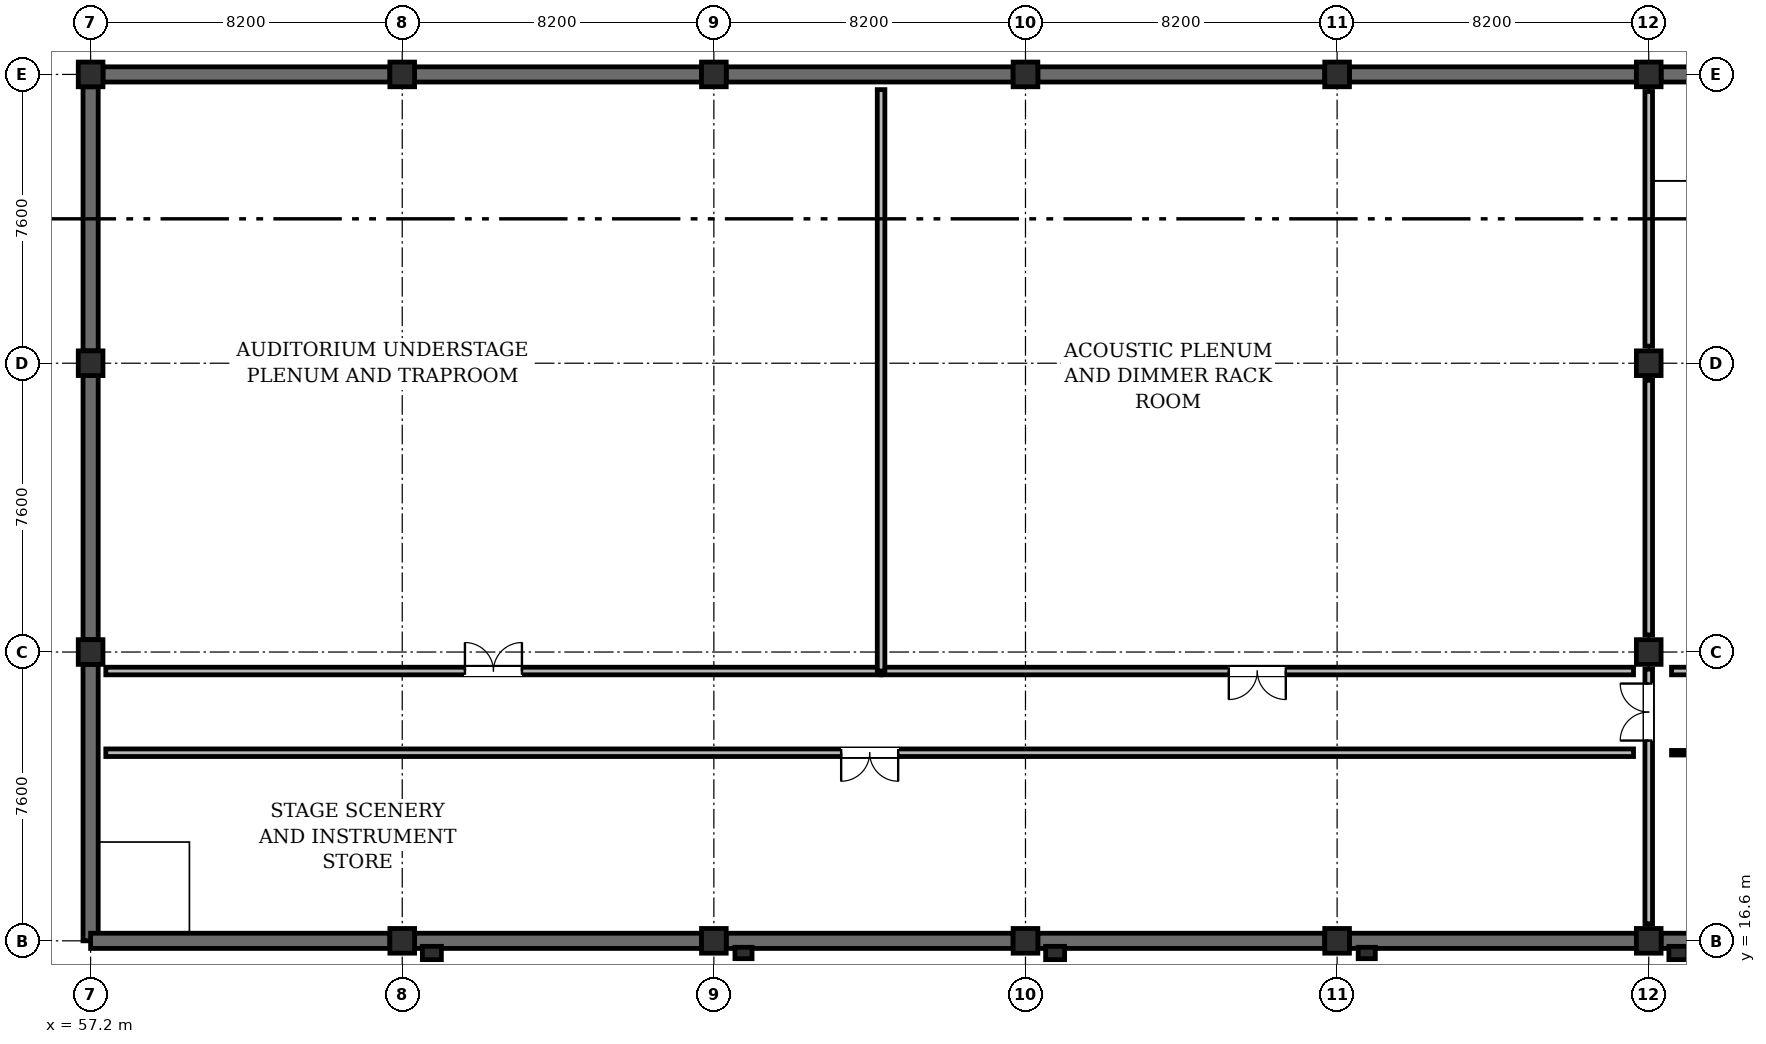
"""IFC4 building model, lengths in metres.
Left out: names, types, materials, properties, quantities, classifications, styles, units other than length and angle.
Written with IfcOpenShell. Run it as: python <this file> out.ifc"""

import sys

from ifc_helpers import new_model, si_unit, direction, frame, frame_2d, origin, origin_2d, place, context, subcontext, project, spatial, rectangle, extrude, element, fill, save


model = new_model("IFC4")
c1 = context("Model", 3, precision=1e-05, world=origin(), true_north=direction((0.0, 1.0)))
c2 = subcontext(c1, "Body", "Model", "MODEL_VIEW")
j1 = project(units=[si_unit("LENGTHUNIT", "METRE"), si_unit("PLANEANGLEUNIT", "RADIAN")], contexts=[c1])
p1 = place(None, origin())
s1 = spatial("IfcSite", under=j1, at=p1, CompositionType="ELEMENT")
p2 = place(p1, origin())
s2 = spatial("IfcBuilding", under=s1, at=p2, CompositionType="ELEMENT")
p3 = place(p2, frame((0.0, 0.0, -4.8)))
s3 = spatial("IfcBuildingStorey", under=s2, at=p3, CompositionType="ELEMENT", Elevation=-4.8)
for number, where, z_axis, x_axis in (
    (1, (57.2, 24.2, 0.0), (0.0, 0.0, 1.0), (1.0, 0.0, 0.0)),
    (2, (57.2, 31.8, 0.0), (0.0, 0.0, 1.0), (1.0, 0.0, 0.0)),
    (3, (57.2, 39.4, 0.0), (0.0, 0.0, 1.0), (1.0, 0.0, 0.0)),
    (4, (65.4, 16.6, 0.0), (0.0, 0.0, 1.0), (1.0, 0.0, 0.0)),
    (5, (65.4, 39.4, 0.0), (0.0, 0.0, 1.0), (1.0, 0.0, 0.0)),
    (6, (73.6, 16.6, 0.0), (0.0, 0.0, 1.0), (1.0, 0.0, 0.0)),
    (7, (73.6, 39.4, 0.0), (0.0, 0.0, 1.0), (1.0, 0.0, 0.0)),
    (8, (81.8, 16.6, 0.0), (0.0, 0.0, 1.0), (1.0, 0.0, 0.0)),
    (9, (81.8, 39.4, 0.0), (0.0, 0.0, 1.0), (1.0, 0.0, 0.0)),
    (10, (90.0, 16.6, 0.0), (0.0, 0.0, 1.0), (1.0, 0.0, 0.0)),
    (11, (90.0, 39.4, 0.0), (0.0, 0.0, 1.0), (1.0, 0.0, 0.0)),
    (12, (98.2, 16.6, 0.0), (0.0, 0.0, 1.0), (1.0, 0.0, 0.0)),
    (13, (98.2, 24.2, 0.0), (0.0, 0.0, 1.0), (1.0, 0.0, 0.0)),
    (14, (98.2, 31.8, 0.0), (0.0, 0.0, 1.0), (1.0, 0.0, 0.0)),
    (15, (98.2, 39.4, 0.0), (0.0, 0.0, 1.0), (1.0, 0.0, 0.0)),
):
    element("IfcColumn", number, at=place(p3, frame(where, z_axis=z_axis, x_axis=x_axis)), inside=s3, PredefinedType="COLUMN", context=c2, shape_type="SweptSolid", body=[
        extrude(rectangle(XDim=0.65, YDim=0.65, at=origin_2d()), origin(), (0.0, 0.0, 1.0), 4.46),
    ])
p4 = place(p3, frame((66.18, 16.28, 0.0), z_axis=(0.0, 0.0, 1.0), x_axis=(1.0, 0.0, 0.0)))
e16 = element("IfcColumn", 16, at=p4, inside=s3, PredefinedType="PILASTER", context=c2, shape_type="SweptSolid", body=[
    extrude(rectangle(XDim=0.5, YDim=0.35, at=origin_2d()), origin(), (0.0, 0.0, 1.0), 4.565),
])
p5 = place(p3, frame((74.38, 16.28, 0.0), z_axis=(0.0, 0.0, 1.0), x_axis=(1.0, 0.0, 0.0)))
e17 = element("IfcColumn", 17, at=p5, inside=s3, PredefinedType="PILASTER", context=c2, shape_type="SweptSolid", body=[
    extrude(rectangle(XDim=0.45, YDim=0.3, at=origin_2d()), origin(), (0.0, 0.0, 1.0), 4.565),
])
p6 = place(p3, frame((82.58, 16.28, 0.0), z_axis=(0.0, 0.0, 1.0), x_axis=(1.0, 0.0, 0.0)))
e18 = element("IfcColumn", 18, at=p6, inside=s3, PredefinedType="PILASTER", context=c2, shape_type="SweptSolid", body=[
    extrude(rectangle(XDim=0.5, YDim=0.35, at=origin_2d()), origin(), (0.0, 0.0, 1.0), 4.565),
])
p7 = place(p3, frame((90.78, 16.28, 0.0), z_axis=(0.0, 0.0, 1.0), x_axis=(1.0, 0.0, 0.0)))
e19 = element("IfcColumn", 19, at=p7, inside=s3, PredefinedType="PILASTER", context=c2, shape_type="SweptSolid", body=[
    extrude(rectangle(XDim=0.45, YDim=0.3, at=origin_2d()), origin(), (0.0, 0.0, 1.0), 4.565),
])
p8 = place(p3, frame((98.98, 16.28, 0.0), z_axis=(0.0, 0.0, 1.0), x_axis=(1.0, 0.0, 0.0)))
e20 = element("IfcColumn", 20, at=p8, inside=s3, PredefinedType="PILASTER", context=c2, shape_type="SweptSolid", body=[
    extrude(rectangle(XDim=0.5, YDim=0.35, at=origin_2d()), origin(), (0.0, 0.0, 1.0), 4.565),
])
p9 = place(p3, frame((57.2, 16.6, 0.0), z_axis=(0.0, 0.0, 1.0), x_axis=(0.0, 1.0, 0.0)))
e21 = element("IfcWall", 21, at=p9, inside=s3, PredefinedType="SOLIDWALL", context=c2, shape_type="SweptSolid", body=[
    extrude(rectangle(XDim=7.275, YDim=0.4, at=frame_2d((3.637, 0.0))), origin(), (0.0, 0.0, 1.0), 4.46),
])
p10 = place(p3, frame((57.2, 24.525, 0.0), z_axis=(0.0, 0.0, 1.0), x_axis=(0.0, 1.0, 0.0)))
e22 = element("IfcWall", 22, at=p10, inside=s3, PredefinedType="SOLIDWALL", context=c2, shape_type="SweptSolid", body=[
    extrude(rectangle(XDim=6.95, YDim=0.4, at=frame_2d((3.475, 0.0))), origin(), (0.0, 0.0, 1.0), 4.46),
])
p11 = place(p3, frame((57.2, 32.125, 0.0), z_axis=(0.0, 0.0, 1.0), x_axis=(0.0, 1.0, 0.0)))
e23 = element("IfcWall", 23, at=p11, inside=s3, PredefinedType="SOLIDWALL", context=c2, shape_type="SweptSolid", body=[
    extrude(rectangle(XDim=6.95, YDim=0.4, at=frame_2d((3.475, 0.0))), origin(), (0.0, 0.0, 1.0), 4.46),
])
p12 = place(p3, frame((57.525, 39.4, 0.0), z_axis=(0.0, 0.0, 1.0), x_axis=(1.0, 0.0, 0.0)))
e24 = element("IfcWall", 24, at=p12, inside=s3, PredefinedType="SOLIDWALL", context=c2, shape_type="SweptSolid", body=[
    extrude(rectangle(XDim=7.55, YDim=0.4, at=frame_2d((3.775, 0.0))), origin(), (0.0, 0.0, 1.0), 4.46),
])
p13 = place(p3, frame((65.725, 39.4, 0.0), z_axis=(0.0, 0.0, 1.0), x_axis=(1.0, 0.0, 0.0)))
e25 = element("IfcWall", 25, at=p13, inside=s3, PredefinedType="SOLIDWALL", context=c2, shape_type="SweptSolid", body=[
    extrude(rectangle(XDim=7.55, YDim=0.4, at=frame_2d((3.775, 0.0))), origin(), (0.0, 0.0, 1.0), 4.46),
])
for number, where, z_axis, x_axis in (
    (26, (73.925, 39.4, 0.0), (0.0, 0.0, 1.0), (1.0, 0.0, 0.0)),
    (27, (82.125, 39.4, 0.0), (0.0, 0.0, 1.0), (1.0, 0.0, 0.0)),
    (28, (90.325, 39.4, 0.0), (0.0, 0.0, 1.0), (1.0, 0.0, 0.0)),
    (29, (98.525, 39.4, 0.0), (0.0, 0.0, 1.0), (1.0, 0.0, 0.0)),
    (30, (98.525, 16.6, 0.0), (0.0, 0.0, 1.0), (1.0, 0.0, 0.0)),
):
    element("IfcWall", number, at=place(p3, frame(where, z_axis=z_axis, x_axis=x_axis)), inside=s3, PredefinedType="SOLIDWALL", context=c2, shape_type="SweptSolid", body=[
        extrude(rectangle(XDim=7.55, YDim=0.4, at=frame_2d((3.775, 0.0))), origin(), (0.0, 0.0, 1.0), 4.46),
    ])
p14 = place(p3, frame((57.2, 16.6, 0.0), z_axis=(0.0, 0.0, 1.0), x_axis=(1.0, 0.0, 0.0)))
e31 = element("IfcWall", 31, at=p14, inside=s3, PredefinedType="SOLIDWALL", context=c2, shape_type="SweptSolid", body=[
    extrude(rectangle(XDim=7.875, YDim=0.4, at=frame_2d((3.938, 0.0))), origin(), (0.0, 0.0, 1.0), 4.46),
])
p15 = place(p3, frame((65.725, 16.6, 0.0), z_axis=(0.0, 0.0, 1.0), x_axis=(1.0, 0.0, 0.0)))
e32 = element("IfcWall", 32, at=p15, inside=s3, PredefinedType="SOLIDWALL", context=c2, shape_type="SweptSolid", body=[
    extrude(rectangle(XDim=7.55, YDim=0.4, at=frame_2d((3.775, 0.0))), origin(), (0.0, 0.0, 1.0), 4.46),
])
for number, where, z_axis, x_axis in (
    (33, (73.925, 16.6, 0.0), (0.0, 0.0, 1.0), (1.0, 0.0, 0.0)),
    (34, (82.125, 16.6, 0.0), (0.0, 0.0, 1.0), (1.0, 0.0, 0.0)),
    (35, (90.325, 16.6, 0.0), (0.0, 0.0, 1.0), (1.0, 0.0, 0.0)),
):
    element("IfcWall", number, at=place(p3, frame(where, z_axis=z_axis, x_axis=x_axis)), inside=s3, PredefinedType="SOLIDWALL", context=c2, shape_type="SweptSolid", body=[
        extrude(rectangle(XDim=7.55, YDim=0.4, at=frame_2d((3.775, 0.0))), origin(), (0.0, 0.0, 1.0), 4.46),
    ])
p16 = place(p3, frame((98.2, 17.05, 0.0), z_axis=(0.0, 0.0, 1.0), x_axis=(0.0, 1.0, 0.0)))
e36 = element("IfcWall", 36, at=p16, inside=s3, PredefinedType="PARTITIONING", context=c2, shape_type="SweptSolid", body=[
    extrude(rectangle(XDim=6.7, YDim=0.2, at=frame_2d((3.35, 0.0))), origin(), (0.0, 0.0, 1.0), 3.595),
])
p17 = place(p16, frame((4.82, 0.0, 0.0)))
e37 = element("IfcOpeningElement", 37, at=p17, cuts=e36, PredefinedType="OPENING", context=c2, shape_type="SweptSolid", body=[
    extrude(rectangle(XDim=1.5, YDim=2.2, at=frame_2d((0.75, 1.1))), frame((0.0, 0.112, 0.0), z_axis=(0.0, -1.0, 0.0), x_axis=(1.0, 0.0, 0.0)), (0.0, 0.0, 1.0), 0.224),
])
p18 = place(p3, frame((98.2, 24.65, 0.0), z_axis=(0.0, 0.0, 1.0), x_axis=(0.0, 1.0, 0.0)))
e38 = element("IfcWall", 38, at=p18, inside=s3, PredefinedType="PARTITIONING", context=c2, shape_type="SweptSolid", body=[
    extrude(rectangle(XDim=6.7, YDim=0.2, at=frame_2d((3.35, 0.0))), origin(), (0.0, 0.0, 1.0), 3.595),
])
p19 = place(p3, frame((98.2, 32.25, 0.0), z_axis=(0.0, 0.0, 1.0), x_axis=(0.0, 1.0, 0.0)))
e39 = element("IfcWall", 39, at=p19, inside=s3, PredefinedType="PARTITIONING", context=c2, shape_type="SweptSolid", body=[
    extrude(rectangle(XDim=6.7, YDim=0.2, at=frame_2d((3.35, 0.0))), origin(), (0.0, 0.0, 1.0), 3.595),
])
p20 = place(p3, frame((122.8, 21.55, 0.0), z_axis=(0.0, 0.0, 1.0), x_axis=(-1.0, 0.0, 0.0)))
e40 = element("IfcWall", 40, at=p20, inside=s3, PredefinedType="PARTITIONING", context=c2, shape_type="SweptSolid", body=[
    extrude(rectangle(XDim=24.0, YDim=0.12, at=frame_2d((12.0, 0.0))), origin(), (0.0, 0.0, 1.0), 3.885),
])
p21 = place(p20, frame((11.475, 0.0, 0.0)))
e41 = element("IfcOpeningElement", 41, at=p21, cuts=e40, PredefinedType="OPENING", context=c2, shape_type="SweptSolid", body=[
    extrude(rectangle(XDim=1.05, YDim=2.2, at=frame_2d((0.525, 1.1))), frame((0.0, 0.072, 0.0), z_axis=(0.0, -1.0, 0.0), x_axis=(1.0, 0.0, 0.0)), (0.0, 0.0, 1.0), 0.144),
])
p22 = place(p3, frame((98.8, 23.7, 0.0), z_axis=(0.0, 0.0, 1.0), x_axis=(1.0, 0.0, 0.0)))
e42 = element("IfcWall", 42, at=p22, inside=s3, PredefinedType="PARTITIONING", context=c2, shape_type="SweptSolid", body=[
    extrude(rectangle(XDim=40.7, YDim=0.2, at=frame_2d((20.35, 0.0))), origin(), (0.0, 0.0, 1.0), 4.405),
])
p23 = place(p22, frame((19.55, 0.0, 0.0)))
e43 = element("IfcOpeningElement", 43, at=p23, cuts=e42, PredefinedType="OPENING", context=c2, shape_type="SweptSolid", body=[
    extrude(rectangle(XDim=1.6, YDim=2.3, at=frame_2d((0.8, 1.15))), frame((0.0, 0.112, 0.0), z_axis=(0.0, -1.0, 0.0), x_axis=(1.0, 0.0, 0.0)), (0.0, 0.0, 1.0), 0.224),
])
p24 = place(p3, frame((57.6, 23.7, 0.0), z_axis=(0.0, 0.0, 1.0), x_axis=(1.0, 0.0, 0.0)))
e44 = element("IfcWall", 44, at=p24, inside=s3, PredefinedType="PARTITIONING", context=c2, shape_type="SweptSolid", body=[
    extrude(rectangle(XDim=20.4, YDim=0.2, at=frame_2d((10.2, 0.0))), origin(), (0.0, 0.0, 1.0), 4.405),
])
p25 = place(p24, frame((9.45, 0.0, 0.0)))
e45 = element("IfcOpeningElement", 45, at=p25, cuts=e44, PredefinedType="OPENING", context=c2, shape_type="SweptSolid", body=[
    extrude(rectangle(XDim=1.5, YDim=2.2, at=frame_2d((0.75, 1.1))), frame((0.0, 0.112, 0.0), z_axis=(0.0, -1.0, 0.0), x_axis=(1.0, 0.0, 0.0)), (0.0, 0.0, 1.0), 0.224),
])
p26 = place(p3, frame((78.0, 23.7, 0.0), z_axis=(0.0, 0.0, 1.0), x_axis=(1.0, 0.0, 0.0)))
e46 = element("IfcWall", 46, at=p26, inside=s3, PredefinedType="PARTITIONING", context=c2, shape_type="SweptSolid", body=[
    extrude(rectangle(XDim=19.8, YDim=0.2, at=frame_2d((9.9, 0.0))), origin(), (0.0, 0.0, 1.0), 4.405),
])
p27 = place(p26, frame((9.15, 0.0, 0.0)))
e47 = element("IfcOpeningElement", 47, at=p27, cuts=e46, PredefinedType="OPENING", context=c2, shape_type="SweptSolid", body=[
    extrude(rectangle(XDim=1.5, YDim=2.2, at=frame_2d((0.75, 1.1))), frame((0.0, 0.112, 0.0), z_axis=(0.0, -1.0, 0.0), x_axis=(1.0, 0.0, 0.0)), (0.0, 0.0, 1.0), 0.224),
])
p28 = place(p3, frame((97.8, 21.55, 0.0), z_axis=(0.0, 0.0, 1.0), x_axis=(-1.0, 0.0, 0.0)))
e48 = element("IfcWall", 48, at=p28, inside=s3, PredefinedType="PARTITIONING", context=c2, shape_type="SweptSolid", body=[
    extrude(rectangle(XDim=40.2, YDim=0.2, at=frame_2d((20.1, 0.0))), origin(), (0.0, 0.0, 1.0), 4.405),
])
p29 = place(p28, frame((19.35, 0.0, 0.0)))
e49 = element("IfcOpeningElement", 49, at=p29, cuts=e48, PredefinedType="OPENING", context=c2, shape_type="SweptSolid", body=[
    extrude(rectangle(XDim=1.5, YDim=2.2, at=frame_2d((0.75, 1.1))), frame((0.0, 0.112, 0.0), z_axis=(0.0, -1.0, 0.0), x_axis=(1.0, 0.0, 0.0)), (0.0, 0.0, 1.0), 0.224),
])
p30 = place(p3, frame((78.0, 39.0, 0.0), z_axis=(0.0, 0.0, 1.0), x_axis=(0.0, -1.0, 0.0)))
e50 = element("IfcWall", 50, at=p30, inside=s3, PredefinedType="PARTITIONING", context=c2, shape_type="SweptSolid", body=[
    extrude(rectangle(XDim=15.3, YDim=0.2, at=frame_2d((7.65, 0.0))), origin(), (0.0, 0.0, 1.0), 4.405),
])
p31 = place(p17, origin())
e51 = element("IfcDoor", 51, at=p31, inside=s3, OperationType="DOUBLE_DOOR_SINGLE_SWING", PredefinedType="DOOR", context=c2, shape_type="SweptSolid", body=[
    extrude(rectangle(XDim=1.5, YDim=2.2, at=frame_2d((0.75, 1.1))), frame((0.0, 0.025, 0.0), z_axis=(0.0, -1.0, 0.0), x_axis=(1.0, 0.0, 0.0)), (0.0, 0.0, 1.0), 0.05),
])
fill(e37, e51)
p32 = place(p25, origin())
e52 = element("IfcDoor", 52, at=p32, inside=s3, OperationType="DOUBLE_DOOR_SINGLE_SWING", PredefinedType="DOOR", context=c2, shape_type="SweptSolid", body=[
    extrude(rectangle(XDim=1.5, YDim=2.2, at=frame_2d((0.75, 1.1))), frame((0.0, 0.025, 0.0), z_axis=(0.0, -1.0, 0.0), x_axis=(1.0, 0.0, 0.0)), (0.0, 0.0, 1.0), 0.05),
])
fill(e45, e52)
p33 = place(p27, frame((1.5, 0.0, 0.0), z_axis=(0.0, 0.0, 1.0), x_axis=(-1.0, 0.0, 0.0)))
e53 = element("IfcDoor", 53, at=p33, inside=s3, OperationType="DOUBLE_DOOR_SINGLE_SWING", PredefinedType="DOOR", context=c2, shape_type="SweptSolid", body=[
    extrude(rectangle(XDim=1.5, YDim=2.2, at=frame_2d((0.75, 1.1))), frame((0.0, 0.025, 0.0), z_axis=(0.0, -1.0, 0.0), x_axis=(1.0, 0.0, 0.0)), (0.0, 0.0, 1.0), 0.05),
])
fill(e47, e53)
p34 = place(p29, origin())
e54 = element("IfcDoor", 54, at=p34, inside=s3, OperationType="DOUBLE_DOOR_SINGLE_SWING", PredefinedType="DOOR", context=c2, shape_type="SweptSolid", body=[
    extrude(rectangle(XDim=1.5, YDim=2.2, at=frame_2d((0.75, 1.1))), frame((0.0, 0.025, 0.0), z_axis=(0.0, -1.0, 0.0), x_axis=(1.0, 0.0, 0.0)), (0.0, 0.0, 1.0), 0.05),
])
fill(e49, e54)
save(model, sys.argv[1])
